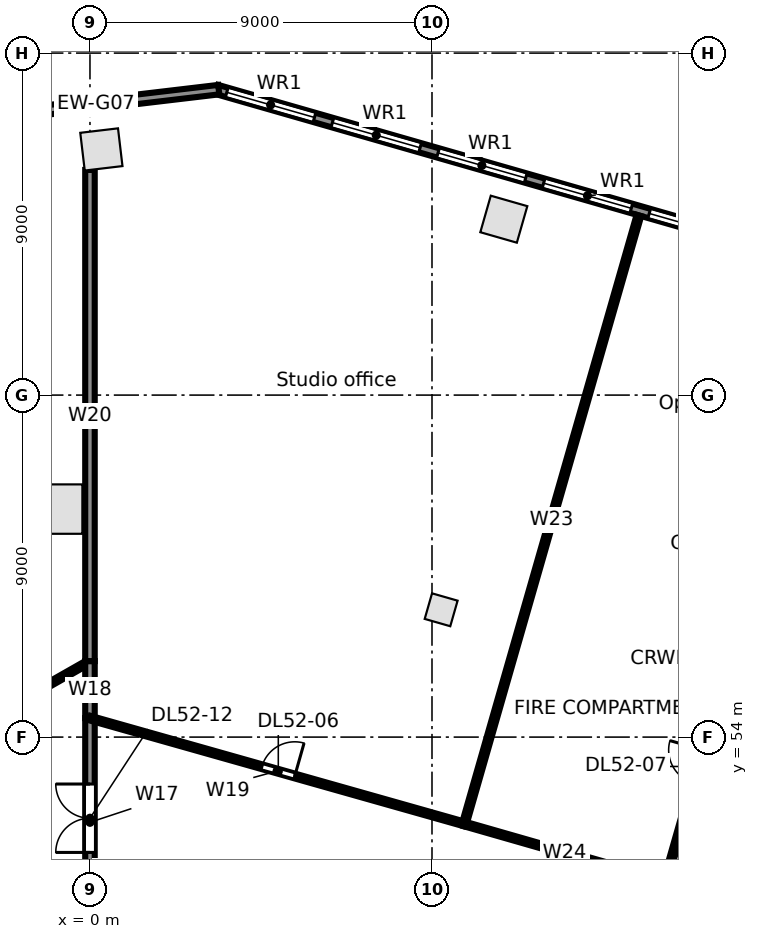
"""IFC4 building model, lengths in metres.
Left out: names, types, materials, properties, quantities, classifications, styles, units other than length and angle.
Written with IfcOpenShell. Run it as: python <this file> out.ifc"""

import sys

from ifc_helpers import new_model, si_unit, direction, frame, frame_2d, origin, origin_2d, place, context, subcontext, project, spatial, rectangle, extrude, element, fill, save


model = new_model("IFC4")
c1 = context("Model", 3, precision=1e-05, world=origin(), true_north=direction((0.0, 1.0)))
c2 = subcontext(c1, "Body", "Model", "MODEL_VIEW")
j1 = project(units=[si_unit("LENGTHUNIT", "METRE"), si_unit("PLANEANGLEUNIT", "RADIAN")], contexts=[c1])
p1 = place(None, origin())
s1 = spatial("IfcSite", under=j1, at=p1, CompositionType="ELEMENT")
p2 = place(p1, origin())
s2 = spatial("IfcBuilding", under=s1, at=p2, CompositionType="ELEMENT")
p3 = place(p2, frame((0.0, 0.0, 238.7)))
s3 = spatial("IfcBuildingStorey", under=s2, at=p3, CompositionType="ELEMENT", Elevation=238.7)
for number, where, z_axis, x_axis in (
    (1, (10.89, 67.629, 0.0), (0.0, 0.0, 1.0), (-0.961, 0.276, 0.0)),
    (2, (0.3, 69.464, 0.0), (0.0, 0.0, 1.0), (-0.993, -0.118, 0.0)),
):
    element("IfcColumn", number, at=place(p3, frame(where, z_axis=z_axis, x_axis=x_axis)), inside=s3, PredefinedType="COLUMN", context=c2, shape_type="SweptSolid", body=[
        extrude(rectangle(XDim=1.0, YDim=1.0, at=origin_2d()), origin(), (0.0, 0.0, 1.0), 3.9),
    ])
p4 = place(p3, frame((-0.85, 60.0, 0.0), z_axis=(0.0, 0.0, 1.0), x_axis=(0.0, 1.0, 0.0)))
e3 = element("IfcColumn", 3, at=p4, inside=s3, PredefinedType="COLUMN", context=c2, shape_type="SweptSolid", body=[
    extrude(rectangle(XDim=1.3, YDim=1.3, at=origin_2d()), origin(), (0.0, 0.0, 1.0), 3.9),
])
p5 = place(p3, frame((9.241, 57.35, 0.0), z_axis=(0.0, 0.0, 1.0), x_axis=(0.961261695938, -0.275637355817, 0.0)))
e4 = element("IfcColumn", 4, at=p5, inside=s3, PredefinedType="COLUMN", context=c2, shape_type="SweptSolid", body=[
    extrude(rectangle(XDim=0.7, YDim=0.7, at=origin_2d()), origin(), (0.0, 0.0, 1.0), 3.9),
])
p6 = place(p3, frame((3.34, 71.042, 0.0), z_axis=(0.0, 0.0, 1.0), x_axis=(0.96126179431, -0.275637012753, 0.0)))
e5 = element("IfcWall", 5, at=p6, inside=s3, PredefinedType="STANDARD", context=c2, shape_type="SweptSolid", body=[
    extrude(rectangle(XDim=34.779, YDim=0.25, at=frame_2d((17.39, 0.0))), origin(), (0.0, 0.0, 1.0), 3.62),
])
p7 = place(p6, frame((32.071, 0.0, 0.8)))
e6 = element("IfcOpeningElement", 6, at=p7, cuts=e5, PredefinedType="OPENING", context=c2, shape_type="SweptSolid", body=[
    extrude(rectangle(XDim=2.4, YDim=2.2, at=frame_2d((1.2, 1.1))), frame((0.0, 0.135, 0.0), z_axis=(0.0, -1.0, 0.0), x_axis=(1.0, 0.0, 0.0)), (0.0, 0.0, 1.0), 0.27),
])
p8 = place(p6, frame((29.18, 0.0, 0.8)))
e7 = element("IfcOpeningElement", 7, at=p8, cuts=e5, PredefinedType="OPENING", context=c2, shape_type="SweptSolid", body=[
    extrude(rectangle(XDim=2.4, YDim=2.2, at=frame_2d((1.2, 1.1))), frame((0.0, 0.135, 0.0), z_axis=(0.0, -1.0, 0.0), x_axis=(1.0, 0.0, 0.0)), (0.0, 0.0, 1.0), 0.27),
])
p9 = place(p6, frame((26.289, 0.0, 0.8)))
e8 = element("IfcOpeningElement", 8, at=p9, cuts=e5, PredefinedType="OPENING", context=c2, shape_type="SweptSolid", body=[
    extrude(rectangle(XDim=2.4, YDim=2.2, at=frame_2d((1.2, 1.1))), frame((0.0, 0.135, 0.0), z_axis=(0.0, -1.0, 0.0), x_axis=(1.0, 0.0, 0.0)), (0.0, 0.0, 1.0), 0.27),
])
p10 = place(p6, frame((23.398, 0.0, 0.8)))
e9 = element("IfcOpeningElement", 9, at=p10, cuts=e5, PredefinedType="OPENING", context=c2, shape_type="SweptSolid", body=[
    extrude(rectangle(XDim=2.4, YDim=2.2, at=frame_2d((1.2, 1.1))), frame((0.0, 0.135, 0.0), z_axis=(0.0, -1.0, 0.0), x_axis=(1.0, 0.0, 0.0)), (0.0, 0.0, 1.0), 0.27),
])
p11 = place(p6, frame((20.508, 0.0, 0.8)))
e10 = element("IfcOpeningElement", 10, at=p11, cuts=e5, PredefinedType="OPENING", context=c2, shape_type="SweptSolid", body=[
    extrude(rectangle(XDim=2.4, YDim=2.2, at=frame_2d((1.2, 1.1))), frame((0.0, 0.135, 0.0), z_axis=(0.0, -1.0, 0.0), x_axis=(1.0, 0.0, 0.0)), (0.0, 0.0, 1.0), 0.27),
])
p12 = place(p6, frame((17.616, 0.0, 0.8)))
e11 = element("IfcOpeningElement", 11, at=p12, cuts=e5, PredefinedType="OPENING", context=c2, shape_type="SweptSolid", body=[
    extrude(rectangle(XDim=2.4, YDim=2.2, at=frame_2d((1.2, 1.1))), frame((0.0, 0.135, 0.0), z_axis=(0.0, -1.0, 0.0), x_axis=(1.0, 0.0, 0.0)), (0.0, 0.0, 1.0), 0.27),
])
p13 = place(p6, frame((14.726, 0.0, 0.8)))
e12 = element("IfcOpeningElement", 12, at=p13, cuts=e5, PredefinedType="OPENING", context=c2, shape_type="SweptSolid", body=[
    extrude(rectangle(XDim=2.4, YDim=2.2, at=frame_2d((1.2, 1.1))), frame((0.0, 0.135, 0.0), z_axis=(0.0, -1.0, 0.0), x_axis=(1.0, 0.0, 0.0)), (0.0, 0.0, 1.0), 0.27),
])
p14 = place(p6, frame((11.834, 0.0, 0.8)))
e13 = element("IfcOpeningElement", 13, at=p14, cuts=e5, PredefinedType="OPENING", context=c2, shape_type="SweptSolid", body=[
    extrude(rectangle(XDim=2.4, YDim=2.2, at=frame_2d((1.2, 1.1))), frame((0.0, 0.135, 0.0), z_axis=(0.0, -1.0, 0.0), x_axis=(1.0, 0.0, 0.0)), (0.0, 0.0, 1.0), 0.27),
])
p15 = place(p6, frame((8.944, 0.0, 0.8)))
e14 = element("IfcOpeningElement", 14, at=p15, cuts=e5, PredefinedType="OPENING", context=c2, shape_type="SweptSolid", body=[
    extrude(rectangle(XDim=2.4, YDim=2.2, at=frame_2d((1.2, 1.1))), frame((0.0, 0.135, 0.0), z_axis=(0.0, -1.0, 0.0), x_axis=(1.0, 0.0, 0.0)), (0.0, 0.0, 1.0), 0.27),
])
p16 = place(p6, frame((6.052, 0.0, 0.8)))
e15 = element("IfcOpeningElement", 15, at=p16, cuts=e5, PredefinedType="OPENING", context=c2, shape_type="SweptSolid", body=[
    extrude(rectangle(XDim=2.4, YDim=2.2, at=frame_2d((1.2, 1.1))), frame((0.0, 0.135, 0.0), z_axis=(0.0, -1.0, 0.0), x_axis=(1.0, 0.0, 0.0)), (0.0, 0.0, 1.0), 0.27),
])
p17 = place(p6, frame((3.162, 0.0, 0.8)))
e16 = element("IfcOpeningElement", 16, at=p17, cuts=e5, PredefinedType="OPENING", context=c2, shape_type="SweptSolid", body=[
    extrude(rectangle(XDim=2.4, YDim=2.2, at=frame_2d((1.2, 1.1))), frame((0.0, 0.135, 0.0), z_axis=(0.0, -1.0, 0.0), x_axis=(1.0, 0.0, 0.0)), (0.0, 0.0, 1.0), 0.27),
])
p18 = place(p6, frame((0.271, 0.0, 0.8)))
e17 = element("IfcOpeningElement", 17, at=p18, cuts=e5, PredefinedType="OPENING", context=c2, shape_type="SweptSolid", body=[
    extrude(rectangle(XDim=2.4, YDim=2.2, at=frame_2d((1.2, 1.1))), frame((0.0, 0.135, 0.0), z_axis=(0.0, -1.0, 0.0), x_axis=(1.0, 0.0, 0.0)), (0.0, 0.0, 1.0), 0.27),
])
p19 = place(p3, frame((-3.071, 70.273, 0.0), z_axis=(0.0, 0.0, 1.0), x_axis=(0.993064524962, 0.11757061394, 0.0)))
e18 = element("IfcWall", 18, at=p19, inside=s3, PredefinedType="STANDARD", context=c2, shape_type="SweptSolid", body=[
    extrude(rectangle(XDim=6.506, YDim=0.25, at=frame_2d((3.253, 0.0))), origin(), (0.0, 0.0, 1.0), 3.62),
])
p20 = place(p3, frame((-6.545, 52.276, 0.0), z_axis=(0.0, 0.0, 1.0), x_axis=(0.869147493537, 0.49455296428, 0.0)))
e19 = element("IfcWall", 19, at=p20, inside=s3, PredefinedType="PARTITIONING", context=c2, shape_type="SweptSolid", body=[
    extrude(rectangle(XDim=7.53, YDim=0.125, at=frame_2d((3.765, 0.0))), origin(), (0.0, 0.0, 1.0), 2.8),
])
p21 = place(p20, frame((2.95, 0.0, 0.0)))
e20 = element("IfcOpeningElement", 20, at=p21, cuts=e19, PredefinedType="OPENING", context=c2, shape_type="SweptSolid", body=[
    extrude(rectangle(XDim=1.8, YDim=2.1, at=frame_2d((0.9, 1.05))), frame((0.0, 0.073, 0.0), z_axis=(0.0, -1.0, 0.0), x_axis=(1.0, 0.0, 0.0)), (0.0, 0.0, 1.0), 0.145),
])
p22 = place(p3, frame((0.0, 49.015, 0.0), z_axis=(0.0, 0.0, 1.0), x_axis=(0.0, 1.0, 0.0)))
e21 = element("IfcWall", 21, at=p22, inside=s3, PredefinedType="PARTITIONING", context=c2, shape_type="SweptSolid", body=[
    extrude(rectangle(XDim=5.485, YDim=0.25, at=frame_2d((2.743, 0.0))), origin(), (0.0, 0.0, 1.0), 3.62),
])
p23 = place(p22, frame((1.95, 0.0, 0.0)))
e22 = element("IfcOpeningElement", 22, at=p23, cuts=e21, PredefinedType="OPENING", context=c2, shape_type="SweptSolid", body=[
    extrude(rectangle(XDim=1.8, YDim=2.1, at=frame_2d((0.9, 1.05))), frame((0.0, 0.135, 0.0), z_axis=(0.0, -1.0, 0.0), x_axis=(1.0, 0.0, 0.0)), (0.0, 0.0, 1.0), 0.27),
])
p24 = place(p3, frame((0.0, 54.5, 0.0), z_axis=(0.0, 0.0, 1.0), x_axis=(0.0, 1.0, 0.0)))
e23 = element("IfcWall", 23, at=p24, inside=s3, PredefinedType="PARTITIONING", context=c2, shape_type="SweptSolid", body=[
    extrude(rectangle(XDim=1.5, YDim=0.25, at=frame_2d((0.75, 0.0))), origin(), (0.0, 0.0, 1.0), 3.62),
])
p25 = place(p3, frame((0.0, 54.5, 0.0), z_axis=(0.0, 0.0, 1.0), x_axis=(0.962263108276, -0.272120764462, 0.0)))
e24 = element("IfcWall", 24, at=p25, inside=s3, PredefinedType="PARTITIONING", context=c2, shape_type="SweptSolid", body=[
    extrude(rectangle(XDim=10.234, YDim=0.125, at=frame_2d((5.117, 0.0))), origin(), (0.0, 0.0, 1.0), 2.9),
])
p26 = place(p25, frame((4.7, 0.0, 0.0)))
e25 = element("IfcOpeningElement", 25, at=p26, cuts=e24, PredefinedType="OPENING", context=c2, shape_type="SweptSolid", body=[
    extrude(rectangle(XDim=0.9, YDim=2.1, at=frame_2d((0.45, 1.05))), frame((0.0, 0.073, 0.0), z_axis=(0.0, -1.0, 0.0), x_axis=(1.0, 0.0, 0.0)), (0.0, 0.0, 1.0), 0.145),
])
p27 = place(p3, frame((0.0, 56.0, 0.0), z_axis=(0.0, 0.0, 1.0), x_axis=(0.0, 1.0, 0.0)))
e26 = element("IfcWall", 26, at=p27, inside=s3, PredefinedType="PARTITIONING", context=c2, shape_type="SweptSolid", body=[
    extrude(rectangle(XDim=12.925, YDim=0.25, at=frame_2d((6.462, 0.0))), origin(), (0.0, 0.0, 1.0), 2.8),
])
p28 = place(p3, frame((9.848, 51.715, 0.0), z_axis=(0.0, 0.0, 1.0), x_axis=(0.27594414117, 0.961173673669, 0.0)))
e27 = element("IfcWall", 27, at=p28, inside=s3, PredefinedType="PARTITIONING", context=c2, shape_type="SweptSolid", body=[
    extrude(rectangle(XDim=16.66, YDim=0.125, at=frame_2d((8.33, 0.0))), origin(), (0.0, 0.0, 1.0), 2.792),
])
p29 = place(p3, frame((9.848, 51.715, 0.0), z_axis=(0.0, 0.0, 1.0), x_axis=(0.961258850611, -0.275647278458, 0.0)))
e28 = element("IfcWall", 28, at=p29, inside=s3, PredefinedType="PARTITIONING", context=c2, shape_type="SweptSolid", body=[
    extrude(rectangle(XDim=5.5, YDim=0.125, at=frame_2d((2.75, 0.0))), origin(), (0.0, 0.0, 1.0), 2.8),
])
p30 = place(p3, frame((15.135, 50.199, 0.0), z_axis=(0.0, 0.0, 1.0), x_axis=(0.275551788837, 0.961286227753, 0.0)))
e29 = element("IfcWall", 29, at=p30, inside=s3, PredefinedType="PARTITIONING", context=c2, shape_type="SweptSolid", body=[
    extrude(rectangle(XDim=6.249, YDim=0.125, at=frame_2d((3.125, 0.0))), origin(), (0.0, 0.0, 1.0), 2.8),
])
p31 = place(p30, frame((2.7, 0.0, 0.0)))
e30 = element("IfcOpeningElement", 30, at=p31, cuts=e29, PredefinedType="OPENING", context=c2, shape_type="SweptSolid", body=[
    extrude(rectangle(XDim=0.9, YDim=2.1, at=frame_2d((0.45, 1.05))), frame((0.0, 0.073, 0.0), z_axis=(0.0, -1.0, 0.0), x_axis=(1.0, 0.0, 0.0)), (0.0, 0.0, 1.0), 0.145),
])
p32 = place(p14, origin())
e31 = element("IfcWindow", 31, at=p32, inside=s3, PartitioningType="SINGLE_PANEL", PredefinedType="WINDOW", context=c2, shape_type="SweptSolid", body=[
    extrude(rectangle(XDim=2.4, YDim=2.2, at=frame_2d((1.2, 1.1))), frame((0.0, 0.03, 0.0), z_axis=(0.0, -1.0, 0.0), x_axis=(1.0, 0.0, 0.0)), (0.0, 0.0, 1.0), 0.06),
])
fill(e13, e31)
p33 = place(p15, origin())
e32 = element("IfcWindow", 32, at=p33, inside=s3, PartitioningType="SINGLE_PANEL", PredefinedType="WINDOW", context=c2, shape_type="SweptSolid", body=[
    extrude(rectangle(XDim=2.4, YDim=2.2, at=frame_2d((1.2, 1.1))), frame((0.0, 0.03, 0.0), z_axis=(0.0, -1.0, 0.0), x_axis=(1.0, 0.0, 0.0)), (0.0, 0.0, 1.0), 0.06),
])
fill(e14, e32)
p34 = place(p16, origin())
e33 = element("IfcWindow", 33, at=p34, inside=s3, PartitioningType="SINGLE_PANEL", PredefinedType="WINDOW", context=c2, shape_type="SweptSolid", body=[
    extrude(rectangle(XDim=2.4, YDim=2.2, at=frame_2d((1.2, 1.1))), frame((0.0, 0.03, 0.0), z_axis=(0.0, -1.0, 0.0), x_axis=(1.0, 0.0, 0.0)), (0.0, 0.0, 1.0), 0.06),
])
fill(e15, e33)
p35 = place(p17, origin())
e34 = element("IfcWindow", 34, at=p35, inside=s3, PartitioningType="SINGLE_PANEL", PredefinedType="WINDOW", context=c2, shape_type="SweptSolid", body=[
    extrude(rectangle(XDim=2.4, YDim=2.2, at=frame_2d((1.2, 1.1))), frame((0.0, 0.03, 0.0), z_axis=(0.0, -1.0, 0.0), x_axis=(1.0, 0.0, 0.0)), (0.0, 0.0, 1.0), 0.06),
])
fill(e16, e34)
p36 = place(p18, origin())
e35 = element("IfcWindow", 35, at=p36, inside=s3, PartitioningType="SINGLE_PANEL", PredefinedType="WINDOW", context=c2, shape_type="SweptSolid", body=[
    extrude(rectangle(XDim=2.4, YDim=2.2, at=frame_2d((1.2, 1.1))), frame((0.0, 0.03, 0.0), z_axis=(0.0, -1.0, 0.0), x_axis=(1.0, 0.0, 0.0)), (0.0, 0.0, 1.0), 0.06),
])
fill(e17, e35)
p37 = place(p26, origin())
e36 = element("IfcDoor", 36, at=p37, inside=s3, OperationType="SINGLE_SWING_RIGHT", PredefinedType="DOOR", context=c2, shape_type="SweptSolid", body=[
    extrude(rectangle(XDim=0.9, YDim=2.1, at=frame_2d((0.45, 1.05))), frame((0.0, 0.025, 0.0), z_axis=(0.0, -1.0, 0.0), x_axis=(1.0, 0.0, 0.0)), (0.0, 0.0, 1.0), 0.05),
])
fill(e25, e36)
p38 = place(p23, origin())
e37 = element("IfcDoor", 37, at=p38, inside=s3, OperationType="DOUBLE_DOOR_SINGLE_SWING", PredefinedType="DOOR", context=c2, shape_type="SweptSolid", body=[
    extrude(rectangle(XDim=1.8, YDim=2.1, at=frame_2d((0.9, 1.05))), frame((0.0, 0.025, 0.0), z_axis=(0.0, -1.0, 0.0), x_axis=(1.0, 0.0, 0.0)), (0.0, 0.0, 1.0), 0.05),
])
fill(e22, e37)
save(model, sys.argv[1])
